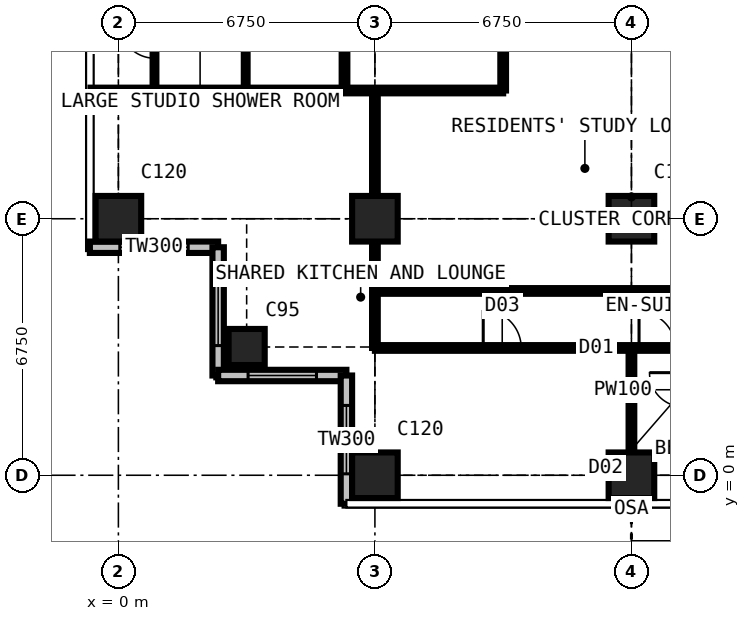
"""IFC4 building model, lengths in metres.
Left out: names, types, materials, properties, quantities, classifications, styles, units other than length and angle.
Written with IfcOpenShell. Run it as: python <this file> out.ifc"""

import sys

from ifc_helpers import new_model, si_unit, direction, frame, frame_2d, origin, origin_2d, place, context, subcontext, project, spatial, rectangle, extrude, element, fill, save


model = new_model("IFC4")
c1 = context("Model", 3, precision=1e-05, world=origin(), true_north=direction((0.0, 1.0)))
c2 = subcontext(c1, "Body", "Model", "MODEL_VIEW")
j1 = project(units=[si_unit("LENGTHUNIT", "METRE"), si_unit("PLANEANGLEUNIT", "RADIAN")], contexts=[c1])
p1 = place(None, origin())
s1 = spatial("IfcSite", under=j1, at=p1, CompositionType="ELEMENT")
p2 = place(p1, origin())
s2 = spatial("IfcBuilding", under=s1, at=p2, CompositionType="ELEMENT")
p3 = place(p2, frame((0.0, 0.0, 189.0)))
s3 = spatial("IfcBuildingStorey", under=s2, at=p3, CompositionType="ELEMENT", Elevation=189.0)
p4 = place(p3, frame((0.0, 6.75, 0.0), z_axis=(0.0, 0.0, 1.0), x_axis=(1.0, 0.0, 0.0)))
e1 = element("IfcColumn", 1, at=p4, inside=s3, PredefinedType="COLUMN", context=c2, shape_type="SweptSolid", body=[
    extrude(rectangle(XDim=1.2, YDim=1.2, at=origin_2d()), origin(), (0.0, 0.0, 1.0), 3.6),
])
p5 = place(p3, frame((3.375, 3.375, 0.0), z_axis=(0.0, 0.0, 1.0), x_axis=(1.0, 0.0, 0.0)))
e2 = element("IfcColumn", 2, at=p5, inside=s3, PredefinedType="COLUMN", context=c2, shape_type="SweptSolid", body=[
    extrude(rectangle(XDim=0.95, YDim=0.95, at=origin_2d()), origin(), (0.0, 0.0, 1.0), 3.6),
])
for number, where, z_axis, x_axis in (
    (3, (6.75, 0.0, 0.0), (0.0, 0.0, 1.0), (1.0, 0.0, 0.0)),
    (4, (6.75, 6.75, 0.0), (0.0, 0.0, 1.0), (1.0, 0.0, 0.0)),
    (5, (13.5, 0.0, 0.0), (0.0, 0.0, 1.0), (1.0, 0.0, 0.0)),
    (6, (13.5, 6.75, 0.0), (0.0, 0.0, 1.0), (1.0, 0.0, 0.0)),
):
    element("IfcColumn", number, at=place(p3, frame(where, z_axis=z_axis, x_axis=x_axis)), inside=s3, PredefinedType="COLUMN", context=c2, shape_type="SweptSolid", body=[
        extrude(rectangle(XDim=1.2, YDim=1.2, at=origin_2d()), origin(), (0.0, 0.0, 1.0), 3.6),
    ])
p6 = place(p3, frame((-0.75, 6.0, 0.0), z_axis=(0.0, 0.0, 1.0), x_axis=(1.0, 0.0, 0.0)))
e7 = element("IfcWall", 7, at=p6, inside=s3, PredefinedType="SOLIDWALL", context=c2, shape_type="SweptSolid", body=[
    extrude(rectangle(XDim=3.375, YDim=0.3, at=frame_2d((1.688, 0.0))), origin(), (0.0, 0.0, 1.0), 3.375),
])
p7 = place(p6, frame((0.788, 0.0, 0.6)))
e8 = element("IfcOpeningElement", 8, at=p7, cuts=e7, PredefinedType="OPENING", context=c2, shape_type="SweptSolid", body=[
    extrude(rectangle(XDim=1.8, YDim=2.1, at=frame_2d((0.9, 1.05))), frame((0.0, 0.16, 0.0), z_axis=(0.0, -1.0, 0.0), x_axis=(1.0, 0.0, 0.0)), (0.0, 0.0, 1.0), 0.32),
])
p8 = place(p3, frame((2.625, 6.0, 0.0), z_axis=(0.0, 0.0, 1.0), x_axis=(0.0, -1.0, 0.0)))
e9 = element("IfcWall", 9, at=p8, inside=s3, PredefinedType="SOLIDWALL", context=c2, shape_type="SweptSolid", body=[
    extrude(rectangle(XDim=3.375, YDim=0.3, at=frame_2d((1.688, 0.0))), origin(), (0.0, 0.0, 1.0), 3.375),
])
p9 = place(p8, frame((0.788, 0.0, 0.6)))
e10 = element("IfcOpeningElement", 10, at=p9, cuts=e9, PredefinedType="OPENING", context=c2, shape_type="SweptSolid", body=[
    extrude(rectangle(XDim=1.8, YDim=2.1, at=frame_2d((0.9, 1.05))), frame((0.0, 0.16, 0.0), z_axis=(0.0, -1.0, 0.0), x_axis=(1.0, 0.0, 0.0)), (0.0, 0.0, 1.0), 0.32),
])
p10 = place(p3, frame((2.625, 2.625, 0.0), z_axis=(0.0, 0.0, 1.0), x_axis=(1.0, 0.0, 0.0)))
e11 = element("IfcWall", 11, at=p10, inside=s3, PredefinedType="SOLIDWALL", context=c2, shape_type="SweptSolid", body=[
    extrude(rectangle(XDim=3.375, YDim=0.3, at=frame_2d((1.688, 0.0))), origin(), (0.0, 0.0, 1.0), 3.375),
])
p11 = place(p10, frame((0.788, 0.0, 0.6)))
e12 = element("IfcOpeningElement", 12, at=p11, cuts=e11, PredefinedType="OPENING", context=c2, shape_type="SweptSolid", body=[
    extrude(rectangle(XDim=1.8, YDim=2.1, at=frame_2d((0.9, 1.05))), frame((0.0, 0.16, 0.0), z_axis=(0.0, -1.0, 0.0), x_axis=(1.0, 0.0, 0.0)), (0.0, 0.0, 1.0), 0.32),
])
p12 = place(p3, frame((6.0, 2.625, 0.0), z_axis=(0.0, 0.0, 1.0), x_axis=(0.0, -1.0, 0.0)))
e13 = element("IfcWall", 13, at=p12, inside=s3, PredefinedType="SOLIDWALL", context=c2, shape_type="SweptSolid", body=[
    extrude(rectangle(XDim=3.375, YDim=0.3, at=frame_2d((1.688, 0.0))), origin(), (0.0, 0.0, 1.0), 3.375),
])
p13 = place(p12, frame((0.788, 0.0, 0.6)))
e14 = element("IfcOpeningElement", 14, at=p13, cuts=e13, PredefinedType="OPENING", context=c2, shape_type="SweptSolid", body=[
    extrude(rectangle(XDim=1.8, YDim=2.1, at=frame_2d((0.9, 1.05))), frame((0.0, 0.16, 0.0), z_axis=(0.0, -1.0, 0.0), x_axis=(1.0, 0.0, 0.0)), (0.0, 0.0, 1.0), 0.32),
])
p14 = place(p3, frame((-0.734, 10.125, 0.0), z_axis=(0.0, 0.0, 1.0), x_axis=(1.0, 0.0, 0.0)))
e15 = element("IfcWall", 15, at=p14, inside=s3, PredefinedType="PARTITIONING", context=c2, shape_type="SweptSolid", body=[
    extrude(rectangle(XDim=10.859, YDim=0.15, at=frame_2d((5.429, 0.0))), origin(), (0.0, 0.0, 1.0), 3.375),
])
p15 = place(p3, frame((0.95, 10.125, 0.0), z_axis=(0.0, 0.0, 1.0), x_axis=(0.0, 1.0, 0.0)))
e16 = element("IfcWall", 16, at=p15, inside=s3, PredefinedType="PARTITIONING", context=c2, shape_type="SweptSolid", body=[
    extrude(rectangle(XDim=2.6, YDim=0.1, at=frame_2d((1.3, 0.0))), origin(), (0.0, 0.0, 1.0), 3.375),
])
p16 = place(p15, frame((0.85, 0.0, 0.0)))
e17 = element("IfcOpeningElement", 17, at=p16, cuts=e16, PredefinedType="OPENING", context=c2, shape_type="SweptSolid", body=[
    extrude(rectangle(XDim=0.9, YDim=2.2, at=frame_2d((0.45, 1.1))), frame((0.0, 0.06, 0.0), z_axis=(0.0, -1.0, 0.0), x_axis=(1.0, 0.0, 0.0)), (0.0, 0.0, 1.0), 0.12),
])
p17 = place(p3, frame((3.35, 10.125, 0.0), z_axis=(0.0, 0.0, 1.0), x_axis=(0.0, 1.0, 0.0)))
e18 = element("IfcWall", 18, at=p17, inside=s3, PredefinedType="PARTITIONING", context=c2, shape_type="SweptSolid", body=[
    extrude(rectangle(XDim=16.875, YDim=0.1, at=frame_2d((8.438, 0.0))), origin(), (0.0, 0.0, 1.0), 3.375),
])
p18 = place(p17, frame((4.2, 0.0, 0.0)))
e19 = element("IfcOpeningElement", 19, at=p18, cuts=e18, PredefinedType="OPENING", context=c2, shape_type="SweptSolid", body=[
    extrude(rectangle(XDim=0.95, YDim=2.2, at=frame_2d((0.475, 1.1))), frame((0.0, 0.06, 0.0), z_axis=(0.0, -1.0, 0.0), x_axis=(1.0, 0.0, 0.0)), (0.0, 0.0, 1.0), 0.12),
])
p19 = place(p17, frame((10.95, 0.0, 0.0)))
e20 = element("IfcOpeningElement", 20, at=p19, cuts=e18, PredefinedType="OPENING", context=c2, shape_type="SweptSolid", body=[
    extrude(rectangle(XDim=0.95, YDim=2.2, at=frame_2d((0.475, 1.1))), frame((0.0, 0.06, 0.0), z_axis=(0.0, -1.0, 0.0), x_axis=(1.0, 0.0, 0.0)), (0.0, 0.0, 1.0), 0.12),
])
p20 = place(p3, frame((5.95, 10.125, 0.0), z_axis=(0.0, 0.0, 1.0), x_axis=(0.0, 1.0, 0.0)))
e21 = element("IfcWall", 21, at=p20, inside=s3, PredefinedType="PARTITIONING", context=c2, shape_type="SweptSolid", body=[
    extrude(rectangle(XDim=2.65, YDim=0.15, at=frame_2d((1.325, 0.0))), origin(), (0.0, 0.0, 1.0), 3.375),
])
p21 = place(p3, frame((6.75, 3.35, 0.0), z_axis=(0.0, 0.0, 1.0), x_axis=(0.0, 1.0, 0.0)))
e22 = element("IfcWall", 22, at=p21, inside=s3, PredefinedType="PARTITIONING", context=c2, shape_type="SweptSolid", body=[
    extrude(rectangle(XDim=6.775, YDim=0.15, at=frame_2d((3.387, 0.0))), origin(), (0.0, 0.0, 1.0), 2.877),
])
p22 = place(p3, frame((6.75, 3.35, 0.0), z_axis=(0.0, 0.0, 1.0), x_axis=(1.0, 0.0, 0.0)))
e23 = element("IfcWall", 23, at=p22, inside=s3, PredefinedType="PARTITIONING", context=c2, shape_type="SweptSolid", body=[
    extrude(rectangle(XDim=20.25, YDim=0.15, at=frame_2d((10.125, 0.0))), origin(), (0.0, 0.0, 1.0), 3.375),
])
p23 = place(p22, frame((2.85, 0.0, 0.0)))
e24 = element("IfcOpeningElement", 24, at=p23, cuts=e23, PredefinedType="OPENING", context=c2, shape_type="SweptSolid", body=[
    extrude(rectangle(XDim=1.0, YDim=2.2, at=frame_2d((0.5, 1.1))), frame((0.0, 0.085, 0.0), z_axis=(0.0, -1.0, 0.0), x_axis=(1.0, 0.0, 0.0)), (0.0, 0.0, 1.0), 0.17),
])
p24 = place(p22, frame((6.95, 0.0, 0.0)))
e25 = element("IfcOpeningElement", 25, at=p24, cuts=e23, PredefinedType="OPENING", context=c2, shape_type="SweptSolid", body=[
    extrude(rectangle(XDim=0.95, YDim=2.2, at=frame_2d((0.475, 1.1))), frame((0.0, 0.085, 0.0), z_axis=(0.0, -1.0, 0.0), x_axis=(1.0, 0.0, 0.0)), (0.0, 0.0, 1.0), 0.17),
])
p25 = place(p22, frame((10.325, 0.0, 0.0)))
e26 = element("IfcOpeningElement", 26, at=p25, cuts=e23, PredefinedType="OPENING", context=c2, shape_type="SweptSolid", body=[
    extrude(rectangle(XDim=0.95, YDim=2.2, at=frame_2d((0.475, 1.1))), frame((0.0, 0.085, 0.0), z_axis=(0.0, -1.0, 0.0), x_axis=(1.0, 0.0, 0.0)), (0.0, 0.0, 1.0), 0.17),
])
p26 = place(p22, frame((13.7, 0.0, 0.0)))
e27 = element("IfcOpeningElement", 27, at=p26, cuts=e23, PredefinedType="OPENING", context=c2, shape_type="SweptSolid", body=[
    extrude(rectangle(XDim=0.95, YDim=2.2, at=frame_2d((0.475, 1.1))), frame((0.0, 0.085, 0.0), z_axis=(0.0, -1.0, 0.0), x_axis=(1.0, 0.0, 0.0)), (0.0, 0.0, 1.0), 0.17),
])
p27 = place(p22, frame((17.075, 0.0, 0.0)))
e28 = element("IfcOpeningElement", 28, at=p27, cuts=e23, PredefinedType="OPENING", context=c2, shape_type="SweptSolid", body=[
    extrude(rectangle(XDim=0.95, YDim=2.2, at=frame_2d((0.475, 1.1))), frame((0.0, 0.085, 0.0), z_axis=(0.0, -1.0, 0.0), x_axis=(1.0, 0.0, 0.0)), (0.0, 0.0, 1.0), 0.17),
])
p28 = place(p3, frame((6.75, 4.85, 0.0), z_axis=(0.0, 0.0, 1.0), x_axis=(1.0, 0.0, 0.0)))
e29 = element("IfcWall", 29, at=p28, inside=s3, PredefinedType="PARTITIONING", context=c2, shape_type="SweptSolid", body=[
    extrude(rectangle(XDim=11.05, YDim=0.15, at=frame_2d((5.525, 0.0))), origin(), (0.0, 0.0, 1.0), 3.375),
])
p29 = place(p3, frame((10.125, 10.125, 0.0), z_axis=(0.0, 0.0, 1.0), x_axis=(0.0, 1.0, 0.0)))
e30 = element("IfcWall", 30, at=p29, inside=s3, PredefinedType="PARTITIONING", context=c2, shape_type="SweptSolid", body=[
    extrude(rectangle(XDim=1.175, YDim=0.15, at=frame_2d((0.587, 0.0))), origin(), (0.0, 0.0, 1.0), 3.375),
])
p30 = place(p3, frame((13.5, -0.734, 0.0), z_axis=(0.0, 0.0, 1.0), x_axis=(0.0, 1.0, 0.0)))
e31 = element("IfcWall", 31, at=p30, inside=s3, PredefinedType="PARTITIONING", context=c2, shape_type="SweptSolid", body=[
    extrude(rectangle(XDim=4.084, YDim=0.15, at=frame_2d((2.042, 0.0))), origin(), (0.0, 0.0, 1.0), 2.61),
])
p31 = place(p7, origin())
e32 = element("IfcWindow", 32, at=p31, inside=s3, PartitioningType="SINGLE_PANEL", PredefinedType="WINDOW", context=c2, shape_type="SweptSolid", body=[
    extrude(rectangle(XDim=1.8, YDim=2.1, at=frame_2d((0.9, 1.05))), frame((0.0, 0.03, 0.0), z_axis=(0.0, -1.0, 0.0), x_axis=(1.0, 0.0, 0.0)), (0.0, 0.0, 1.0), 0.06),
])
fill(e8, e32)
p32 = place(p9, origin())
e33 = element("IfcWindow", 33, at=p32, inside=s3, PartitioningType="SINGLE_PANEL", PredefinedType="WINDOW", context=c2, shape_type="SweptSolid", body=[
    extrude(rectangle(XDim=1.8, YDim=2.1, at=frame_2d((0.9, 1.05))), frame((0.0, 0.03, 0.0), z_axis=(0.0, -1.0, 0.0), x_axis=(1.0, 0.0, 0.0)), (0.0, 0.0, 1.0), 0.06),
])
fill(e10, e33)
p33 = place(p11, origin())
e34 = element("IfcWindow", 34, at=p33, inside=s3, PartitioningType="SINGLE_PANEL", PredefinedType="WINDOW", context=c2, shape_type="SweptSolid", body=[
    extrude(rectangle(XDim=1.8, YDim=2.1, at=frame_2d((0.9, 1.05))), frame((0.0, 0.03, 0.0), z_axis=(0.0, -1.0, 0.0), x_axis=(1.0, 0.0, 0.0)), (0.0, 0.0, 1.0), 0.06),
])
fill(e12, e34)
p34 = place(p13, origin())
e35 = element("IfcWindow", 35, at=p34, inside=s3, PartitioningType="SINGLE_PANEL", PredefinedType="WINDOW", context=c2, shape_type="SweptSolid", body=[
    extrude(rectangle(XDim=1.8, YDim=2.1, at=frame_2d((0.9, 1.05))), frame((0.0, 0.03, 0.0), z_axis=(0.0, -1.0, 0.0), x_axis=(1.0, 0.0, 0.0)), (0.0, 0.0, 1.0), 0.06),
])
fill(e14, e35)
p35 = place(p23, origin())
e36 = element("IfcDoor", 36, at=p35, inside=s3, OperationType="SINGLE_SWING_LEFT", PredefinedType="DOOR", context=c2, shape_type="SweptSolid", body=[
    extrude(rectangle(XDim=1.0, YDim=2.2, at=frame_2d((0.5, 1.1))), frame((0.0, 0.025, 0.0), z_axis=(0.0, -1.0, 0.0), x_axis=(1.0, 0.0, 0.0)), (0.0, 0.0, 1.0), 0.05),
])
fill(e24, e36)
p36 = place(p24, origin())
e37 = element("IfcDoor", 37, at=p36, inside=s3, OperationType="SINGLE_SWING_LEFT", PredefinedType="DOOR", context=c2, shape_type="SweptSolid", body=[
    extrude(rectangle(XDim=0.95, YDim=2.2, at=frame_2d((0.475, 1.1))), frame((0.0, 0.025, 0.0), z_axis=(0.0, -1.0, 0.0), x_axis=(1.0, 0.0, 0.0)), (0.0, 0.0, 1.0), 0.05),
])
fill(e25, e37)
p37 = place(p16, origin())
e38 = element("IfcDoor", 38, at=p37, inside=s3, OperationType="SINGLE_SWING_RIGHT", PredefinedType="DOOR", context=c2, shape_type="SweptSolid", body=[
    extrude(rectangle(XDim=0.9, YDim=2.2, at=frame_2d((0.45, 1.1))), frame((0.0, 0.025, 0.0), z_axis=(0.0, -1.0, 0.0), x_axis=(1.0, 0.0, 0.0)), (0.0, 0.0, 1.0), 0.05),
])
fill(e17, e38)
save(model, sys.argv[1])
